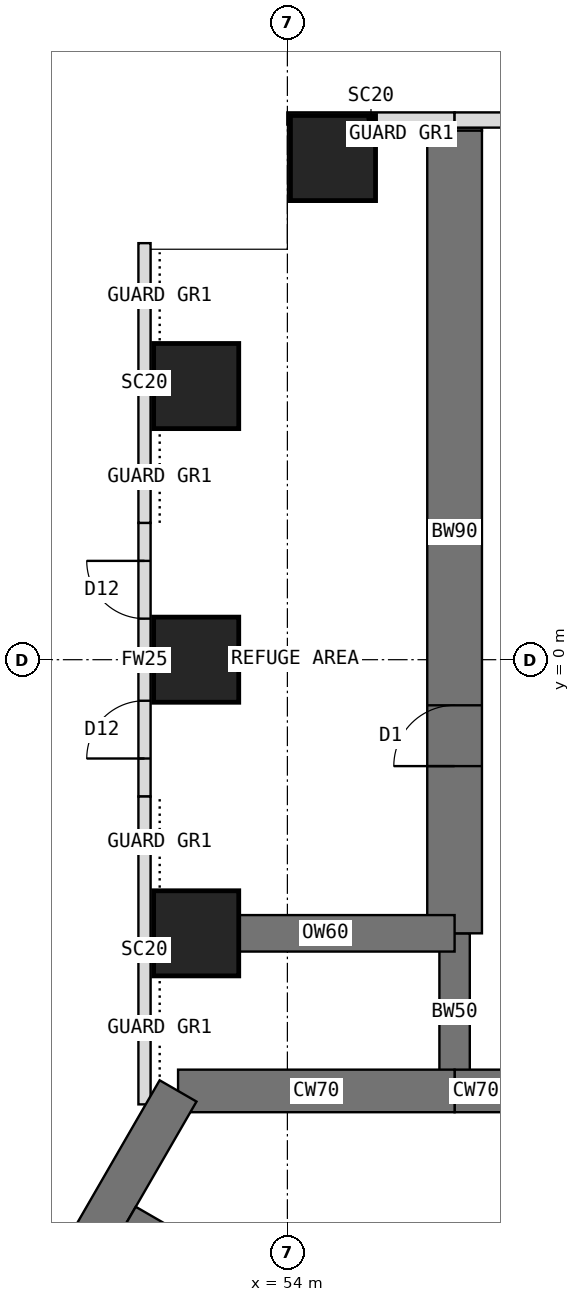
"""IFC4 building model, lengths in metres.
Left out: names, types, materials, properties, quantities, classifications, styles, units other than length and angle.
Written with IfcOpenShell. Run it as: python <this file> out.ifc"""

import sys

from ifc_helpers import new_model, si_unit, direction, frame, frame_2d, origin, origin_2d, place, context, subcontext, project, spatial, rectangle, extrude, element, fill, save


model = new_model("IFC4")
c1 = context("Model", 3, precision=1e-05, world=origin(), true_north=direction((0.0, 1.0)))
c2 = subcontext(c1, "Body", "Model", "MODEL_VIEW")
j1 = project(units=[si_unit("LENGTHUNIT", "METRE"), si_unit("PLANEANGLEUNIT", "RADIAN")], contexts=[c1])
p1 = place(None, origin())
s1 = spatial("IfcSite", under=j1, at=p1, CompositionType="ELEMENT")
p2 = place(p1, origin())
s2 = spatial("IfcBuilding", under=s1, at=p2, CompositionType="ELEMENT")
p3 = place(p2, frame((0.0, 0.0, 92.5)))
s3 = spatial("IfcBuildingStorey", under=s2, at=p3, CompositionType="ELEMENT", Elevation=92.5)
p4 = place(p3, frame((60.25, -7.092, 0.0), z_axis=(0.0, 0.0, 1.0), x_axis=(-1.0, 0.0, 0.0)))
e1 = element("IfcWall", 1, at=p4, inside=s3, PredefinedType="SHEAR", context=c2, shape_type="SweptSolid", body=[
    extrude(rectangle(XDim=3.5, YDim=0.7, at=frame_2d((1.75, 0.0))), origin(), (0.0, 0.0, 1.0), 5.0),
])
p5 = place(p4, frame((0.85, 0.0, 0.0)))
e2 = element("IfcOpeningElement", 2, at=p5, cuts=e1, PredefinedType="OPENING", context=c2, shape_type="SweptSolid", body=[
    extrude(rectangle(XDim=1.8, YDim=2.1, at=frame_2d((0.9, 1.05))), frame((0.0, 0.36, 0.0), z_axis=(0.0, -1.0, 0.0), x_axis=(1.0, 0.0, 0.0)), (0.0, 0.0, 1.0), 0.72),
])
p6 = place(p3, frame((56.75, -7.092, 0.0), z_axis=(0.0, 0.0, 1.0), x_axis=(-1.0, 0.0, 0.0)))
e3 = element("IfcWall", 3, at=p6, inside=s3, PredefinedType="SHEAR", context=c2, shape_type="SweptSolid", body=[
    extrude(rectangle(XDim=4.548, YDim=0.7, at=frame_2d((2.274, 0.0))), origin(), (0.0, 0.0, 1.0), 5.0),
])
p7 = place(p3, frame((52.202, -7.092, 0.0), z_axis=(0.0, 0.0, 1.0), x_axis=(-0.500005998175, -0.866021940709, 0.0)))
e4 = element("IfcWall", 4, at=p7, inside=s3, PredefinedType="SHEAR", context=c2, shape_type="SweptSolid", body=[
    extrude(rectangle(XDim=12.596, YDim=0.7, at=frame_2d((6.298, 0.0))), origin(), (0.0, 0.0, 1.0), 5.0),
])
p8 = place(p3, frame((56.75, -7.092, 0.0), z_axis=(0.0, 0.0, 1.0), x_axis=(0.0, 1.0, 0.0)))
e5 = element("IfcWall", 5, at=p8, inside=s3, PredefinedType="SHEAR", context=c2, shape_type="SweptSolid", body=[
    extrude(rectangle(XDim=2.592, YDim=0.5, at=frame_2d((1.296, 0.0))), origin(), (0.0, 0.0, 1.0), 5.0),
])
p9 = place(p3, frame((56.75, -4.5, 0.0), z_axis=(0.0, 0.0, 1.0), x_axis=(0.0, 1.0, 0.0)))
e6 = element("IfcWall", 6, at=p9, inside=s3, PredefinedType="SHEAR", context=c2, shape_type="SweptSolid", body=[
    extrude(rectangle(XDim=13.2, YDim=0.9, at=frame_2d((6.6, 0.0))), origin(), (0.0, 0.0, 1.0), 5.0),
])
p10 = place(p9, frame((2.75, 0.0, 0.0)))
e7 = element("IfcOpeningElement", 7, at=p10, cuts=e6, PredefinedType="OPENING", context=c2, shape_type="SweptSolid", body=[
    extrude(rectangle(XDim=1.0, YDim=2.1, at=frame_2d((0.5, 1.05))), frame((0.0, 0.46, 0.0), z_axis=(0.0, -1.0, 0.0), x_axis=(1.0, 0.0, 0.0)), (0.0, 0.0, 1.0), 0.92),
])
for number, where, z_axis, x_axis in (
    (8, (52.5, -4.5, 0.0), (0.0, 0.0, 1.0), (1.0, 0.0, 0.0)),
    (9, (52.5, 0.0, 0.0), (0.0, 0.0, 1.0), (1.0, 0.0, 0.0)),
    (10, (52.5, 4.5, 0.0), (0.0, 0.0, 1.0), (1.0, 0.0, 0.0)),
    (11, (54.75, 8.25, 0.0), (0.0, 0.0, 1.0), (1.0, 0.0, 0.0)),
):
    element("IfcColumn", number, at=place(p3, frame(where, z_axis=z_axis, x_axis=x_axis)), inside=s3, PredefinedType="COLUMN", context=c2, shape_type="SweptSolid", body=[
        extrude(rectangle(XDim=1.4, YDim=1.4, at=origin_2d()), origin(), (0.0, 0.0, 1.0), 5.0),
    ])
p11 = place(p3, frame((56.75, -4.5, 0.0), z_axis=(0.0, 0.0, 1.0), x_axis=(-1.0, 0.0, 0.0)))
e12 = element("IfcWall", 12, at=p11, inside=s3, PredefinedType="SHEAR", context=c2, shape_type="SweptSolid", body=[
    extrude(rectangle(XDim=4.25, YDim=0.6, at=frame_2d((2.125, 0.0))), origin(), (0.0, 0.0, 1.0), 5.0),
])
p12 = place(p3, frame((51.65, -7.313, 0.0), z_axis=(0.0, 0.0, 1.0), x_axis=(0.0, 1.0, 0.0)))
e13 = element("IfcWall", 13, at=p12, inside=s3, PredefinedType="USERDEFINED", context=c2, shape_type="SweptSolid", body=[
    extrude(rectangle(XDim=5.063, YDim=0.2, at=frame_2d((2.531, 0.0))), origin(), (0.0, 0.0, 1.0), 4.8),
])
p13 = place(p3, frame((51.65, -2.25, 0.0), z_axis=(0.0, 0.0, 1.0), x_axis=(0.0, 1.0, 0.0)))
e14 = element("IfcWall", 14, at=p13, inside=s3, PredefinedType="STANDARD", context=c2, shape_type="SweptSolid", body=[
    extrude(rectangle(XDim=4.5, YDim=0.2, at=frame_2d((2.25, 0.0))), origin(), (0.0, 0.0, 1.0), 4.8),
])
p14 = place(p13, frame((0.625, 0.0, 0.0)))
e15 = element("IfcOpeningElement", 15, at=p14, cuts=e14, PredefinedType="OPENING", context=c2, shape_type="SweptSolid", body=[
    extrude(rectangle(XDim=0.95, YDim=2.4, at=frame_2d((0.475, 1.2))), frame((0.0, 0.11, 0.0), z_axis=(0.0, -1.0, 0.0), x_axis=(1.0, 0.0, 0.0)), (0.0, 0.0, 1.0), 0.22),
])
p15 = place(p13, frame((2.925, 0.0, 0.0)))
e16 = element("IfcOpeningElement", 16, at=p15, cuts=e14, PredefinedType="OPENING", context=c2, shape_type="SweptSolid", body=[
    extrude(rectangle(XDim=0.95, YDim=2.4, at=frame_2d((0.475, 1.2))), frame((0.0, 0.11, 0.0), z_axis=(0.0, -1.0, 0.0), x_axis=(1.0, 0.0, 0.0)), (0.0, 0.0, 1.0), 0.22),
])
p16 = place(p3, frame((51.65, 2.25, 0.0), z_axis=(0.0, 0.0, 1.0), x_axis=(0.0, 1.0, 0.0)))
e17 = element("IfcWall", 17, at=p16, inside=s3, PredefinedType="USERDEFINED", context=c2, shape_type="SweptSolid", body=[
    extrude(rectangle(XDim=4.6, YDim=0.2, at=frame_2d((2.3, 0.0))), origin(), (0.0, 0.0, 1.0), 4.8),
])
p17 = place(p3, frame((60.25, 8.875, 0.0), z_axis=(0.0, 0.0, 1.0), x_axis=(-1.0, 0.0, 0.0)))
e18 = element("IfcWall", 18, at=p17, inside=s3, PredefinedType="STANDARD", context=c2, shape_type="SweptSolid", body=[
    extrude(rectangle(XDim=3.5, YDim=0.25, at=frame_2d((1.75, 0.0))), origin(), (0.0, 0.0, 1.0), 4.8),
])
p18 = place(p3, frame((56.75, 8.9, 0.0), z_axis=(0.0, 0.0, 1.0), x_axis=(-1.0, 0.0, 0.0)))
e19 = element("IfcWall", 19, at=p18, inside=s3, PredefinedType="USERDEFINED", context=c2, shape_type="SweptSolid", body=[
    extrude(rectangle(XDim=2.75, YDim=0.2, at=frame_2d((1.375, 0.0))), origin(), (0.0, 0.0, 1.0), 4.8),
])
p19 = place(p3, frame((56.75, 8.7, 0.0), z_axis=(0.0, 0.0, 1.0), x_axis=(0.0, 1.0, 0.0)))
e20 = element("IfcWall", 20, at=p19, inside=s3, PredefinedType="PARTITIONING", context=c2, shape_type="SweptSolid", body=[
    extrude(rectangle(XDim=0.05, YDim=0.9, at=frame_2d((0.025, 0.0))), origin(), (0.0, 0.0, 1.0), 4.8),
])
p20 = place(p3, frame((56.48, -12.099, 0.0), z_axis=(0.0, 0.0, 1.0), x_axis=(-0.866023886965, 0.500002627198, 0.0)))
e21 = element("IfcWall", 21, at=p20, inside=s3, PredefinedType="SHEAR", context=c2, shape_type="SweptSolid", body=[
    extrude(rectangle(XDim=5.858, YDim=0.4, at=frame_2d((2.929, 0.0))), origin(), (0.0, 0.0, 1.0), 5.0),
])
p21 = place(p14, origin())
e22 = element("IfcDoor", 22, at=p21, inside=s3, OperationType="SINGLE_SWING_LEFT", PredefinedType="DOOR", context=c2, shape_type="SweptSolid", body=[
    extrude(rectangle(XDim=0.95, YDim=2.4, at=frame_2d((0.475, 1.2))), frame((0.0, 0.025, 0.0), z_axis=(0.0, -1.0, 0.0), x_axis=(1.0, 0.0, 0.0)), (0.0, 0.0, 1.0), 0.05),
])
fill(e15, e22)
p22 = place(p15, origin())
e23 = element("IfcDoor", 23, at=p22, inside=s3, OperationType="SINGLE_SWING_RIGHT", PredefinedType="DOOR", context=c2, shape_type="SweptSolid", body=[
    extrude(rectangle(XDim=0.95, YDim=2.4, at=frame_2d((0.475, 1.2))), frame((0.0, 0.025, 0.0), z_axis=(0.0, -1.0, 0.0), x_axis=(1.0, 0.0, 0.0)), (0.0, 0.0, 1.0), 0.05),
])
fill(e16, e23)
p23 = place(p10, origin())
e24 = element("IfcDoor", 24, at=p23, inside=s3, OperationType="SINGLE_SWING_LEFT", PredefinedType="DOOR", context=c2, shape_type="SweptSolid", body=[
    extrude(rectangle(XDim=0.92, YDim=2.06, at=frame_2d((0.5, 1.03))), frame((0.0, 0.025, 0.0), z_axis=(0.0, -1.0, 0.0), x_axis=(1.0, 0.0, 0.0)), (0.0, 0.0, 1.0), 0.05),
    extrude(rectangle(XDim=0.04, YDim=2.1, at=frame_2d((0.02, 1.05))), frame((0.0, 0.45, 0.0), z_axis=(0.0, -1.0, 0.0), x_axis=(1.0, 0.0, 0.0)), (0.0, 0.0, 1.0), 0.899),
    extrude(rectangle(XDim=0.04, YDim=2.1, at=frame_2d((0.98, 1.05))), frame((0.0, 0.45, 0.0), z_axis=(0.0, -1.0, 0.0), x_axis=(1.0, 0.0, 0.0)), (0.0, 0.0, 1.0), 0.899),
    extrude(rectangle(XDim=0.92, YDim=0.04, at=frame_2d((0.5, 2.08))), frame((0.0, 0.45, 0.0), z_axis=(0.0, -1.0, 0.0), x_axis=(1.0, 0.0, 0.0)), (0.0, 0.0, 1.0), 0.899),
])
fill(e7, e24)
save(model, sys.argv[1])
